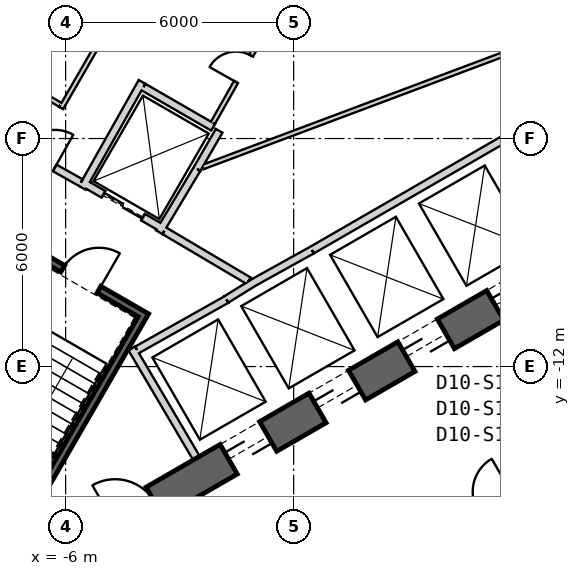
"""IFC4 building model, lengths in metres.
Left out: names, types, materials, properties, quantities, classifications, styles, units other than length and angle.
Written with IfcOpenShell. Run it as: python <this file> out.ifc"""

import sys

from ifc_helpers import new_model, si_unit, direction, frame, frame_2d, origin, place, context, subcontext, project, spatial, rectangle, extrude, element, fill, save


model = new_model("IFC4")
c1 = context("Model", 3, precision=1e-05, world=origin(), true_north=direction((0.0, 1.0)))
c2 = subcontext(c1, "Body", "Model", "MODEL_VIEW")
j1 = project(units=[si_unit("LENGTHUNIT", "METRE"), si_unit("PLANEANGLEUNIT", "RADIAN")], contexts=[c1])
p1 = place(None, origin())
s1 = spatial("IfcSite", under=j1, at=p1, CompositionType="ELEMENT")
p2 = place(p1, origin())
s2 = spatial("IfcBuilding", under=s1, at=p2, CompositionType="ELEMENT")
p3 = place(p2, frame((0.0, 0.0, 253.2)))
s3 = spatial("IfcBuildingStorey", under=s2, at=p3, CompositionType="ELEMENT", Elevation=253.2)
p4 = place(p3, frame((-7.825, -17.97, 0.0), z_axis=(0.0, 0.0, 1.0), x_axis=(0.866028369851, 0.499994862586, 0.0)))
e1 = element("IfcWall", 1, at=p4, inside=s3, PredefinedType="SHEAR", context=c2, shape_type="SweptSolid", body=[
    extrude(rectangle(XDim=31.523, YDim=0.9, at=frame_2d((15.762, 0.0))), origin(), (0.0, 0.0, 1.0), 4.0),
])
p5 = place(p4, frame((7.062, 0.0, 0.0)))
e2 = element("IfcOpeningElement", 2, at=p5, cuts=e1, PredefinedType="OPENING", context=c2, shape_type="SweptSolid", body=[
    extrude(rectangle(XDim=1.2, YDim=2.4, at=frame_2d((0.6, 1.2))), frame((0.0, 0.46, 0.0), z_axis=(0.0, -1.0, 0.0), x_axis=(1.0, 0.0, 0.0)), (0.0, 0.0, 1.0), 0.92),
])
p6 = place(p4, frame((9.762, 0.0, 0.0)))
e3 = element("IfcOpeningElement", 3, at=p6, cuts=e1, PredefinedType="OPENING", context=c2, shape_type="SweptSolid", body=[
    extrude(rectangle(XDim=1.2, YDim=2.4, at=frame_2d((0.6, 1.2))), frame((0.0, 0.46, 0.0), z_axis=(0.0, -1.0, 0.0), x_axis=(1.0, 0.0, 0.0)), (0.0, 0.0, 1.0), 0.92),
])
p7 = place(p4, frame((12.462, 0.0, 0.0)))
e4 = element("IfcOpeningElement", 4, at=p7, cuts=e1, PredefinedType="OPENING", context=c2, shape_type="SweptSolid", body=[
    extrude(rectangle(XDim=1.2, YDim=2.4, at=frame_2d((0.6, 1.2))), frame((0.0, 0.46, 0.0), z_axis=(0.0, -1.0, 0.0), x_axis=(1.0, 0.0, 0.0)), (0.0, 0.0, 1.0), 0.92),
])
p8 = place(p4, frame((15.162, 0.0, 0.0)))
e5 = element("IfcOpeningElement", 5, at=p8, cuts=e1, PredefinedType="OPENING", context=c2, shape_type="SweptSolid", body=[
    extrude(rectangle(XDim=1.2, YDim=2.4, at=frame_2d((0.6, 1.2))), frame((0.0, 0.46, 0.0), z_axis=(0.0, -1.0, 0.0), x_axis=(1.0, 0.0, 0.0)), (0.0, 0.0, 1.0), 0.92),
])
p9 = place(p4, frame((17.862, 0.0, 0.0)))
e6 = element("IfcOpeningElement", 6, at=p9, cuts=e1, PredefinedType="OPENING", context=c2, shape_type="SweptSolid", body=[
    extrude(rectangle(XDim=1.2, YDim=2.4, at=frame_2d((0.6, 1.2))), frame((0.0, 0.46, 0.0), z_axis=(0.0, -1.0, 0.0), x_axis=(1.0, 0.0, 0.0)), (0.0, 0.0, 1.0), 0.92),
])
p10 = place(p4, frame((20.562, 0.0, 0.0)))
e7 = element("IfcOpeningElement", 7, at=p10, cuts=e1, PredefinedType="OPENING", context=c2, shape_type="SweptSolid", body=[
    extrude(rectangle(XDim=1.2, YDim=2.4, at=frame_2d((0.6, 1.2))), frame((0.0, 0.46, 0.0), z_axis=(0.0, -1.0, 0.0), x_axis=(1.0, 0.0, 0.0)), (0.0, 0.0, 1.0), 0.92),
])
p11 = place(p4, frame((26.712, 0.0, 0.0)))
e8 = element("IfcOpeningElement", 8, at=p11, cuts=e1, PredefinedType="OPENING", context=c2, shape_type="SweptSolid", body=[
    extrude(rectangle(XDim=1.2, YDim=2.4, at=frame_2d((0.6, 1.2))), frame((0.0, 0.46, 0.0), z_axis=(0.0, -1.0, 0.0), x_axis=(1.0, 0.0, 0.0)), (0.0, 0.0, 1.0), 0.92),
])
p12 = place(p4, frame((3.612, 0.0, 0.0)))
e9 = element("IfcOpeningElement", 9, at=p12, cuts=e1, PredefinedType="OPENING", context=c2, shape_type="SweptSolid", body=[
    extrude(rectangle(XDim=1.2, YDim=2.4, at=frame_2d((0.6, 1.2))), frame((0.0, 0.46, 0.0), z_axis=(0.0, -1.0, 0.0), x_axis=(1.0, 0.0, 0.0)), (0.0, 0.0, 1.0), 0.92),
])
p13 = place(p3, frame((0.483, -8.936, 0.0), z_axis=(0.0, 0.0, 1.0), x_axis=(0.866030989016, 0.499990325971, 0.0)))
e10 = element("IfcWall", 10, at=p13, inside=s3, PredefinedType="PLUMBINGWALL", context=c2, shape_type="SweptSolid", body=[
    extrude(rectangle(XDim=8.1, YDim=0.2, at=frame_2d((4.05, 0.0))), origin(), (0.0, 0.0, 1.0), 3.7),
])
p14 = place(p3, frame((-2.558, -14.409, 0.0), z_axis=(0.0, 0.0, 1.0), x_axis=(-0.507997497166, 0.861358544901, 0.0)))
e11 = element("IfcWall", 11, at=p14, inside=s3, PredefinedType="PLUMBINGWALL", context=c2, shape_type="SweptSolid", body=[
    extrude(rectangle(XDim=3.35, YDim=0.2, at=frame_2d((1.675, 0.0))), origin(), (0.0, 0.0, 1.0), 3.7),
])
p15 = place(p3, frame((-1.769, -10.237, 0.0), z_axis=(0.0, 0.0, 1.0), x_axis=(-0.871534483978, -0.490334215854, 0.0)))
e12 = element("IfcWall", 12, at=p15, inside=s3, PredefinedType="PLUMBINGWALL", context=c2, shape_type="SweptSolid", body=[
    extrude(rectangle(XDim=2.7, YDim=0.2, at=frame_2d((1.35, 0.0))), origin(), (0.0, 0.0, 1.0), 3.7),
])
p16 = place(p3, frame((-1.024, -9.771, 0.0), z_axis=(0.0, 0.0, 1.0), x_axis=(-0.850348075135, -0.526220629693, 0.0)))
e13 = element("IfcWall", 13, at=p16, inside=s3, PredefinedType="PLUMBINGWALL", context=c2, shape_type="SweptSolid", body=[
    extrude(rectangle(XDim=0.878, YDim=0.2, at=frame_2d((0.439, 0.0))), origin(), (0.0, 0.0, 1.0), 3.7),
])
p17 = place(p3, frame((-1.13, -9.831, 0.0), z_axis=(0.0, 0.0, 1.0), x_axis=(0.874269620932, 0.485440655401, 0.0)))
e14 = element("IfcWall", 14, at=p17, inside=s3, PredefinedType="PLUMBINGWALL", context=c2, shape_type="SweptSolid", body=[
    extrude(rectangle(XDim=1.845, YDim=0.2, at=frame_2d((0.922, 0.0))), origin(), (0.0, 0.0, 1.0), 3.7),
])
p18 = place(p3, frame((-3.905, -10.563, -0.3), z_axis=(0.0, 0.0, 1.0), x_axis=(-0.500012932018, -0.866017937352, 0.0)))
e15 = element("IfcWall", 15, at=p18, inside=s3, PredefinedType="SHEAR", context=c2, shape_type="SweptSolid", body=[
    extrude(rectangle(XDim=8.1, YDim=0.2, at=frame_2d((4.05, 0.0))), origin(), (0.0, 0.0, 1.0), 4.0),
])
p19 = place(p3, frame((-4.041, -10.599, -0.3), z_axis=(0.0, 0.0, 1.0), x_axis=(-0.866047807691, 0.499961193289, 0.0)))
e16 = element("IfcWall", 16, at=p19, inside=s3, PredefinedType="SHEAR", context=c2, shape_type="SweptSolid", body=[
    extrude(rectangle(XDim=3.6, YDim=0.2, at=frame_2d((1.8, 0.0))), origin(), (0.0, 0.0, 1.0), 4.0),
])
p20 = place(p19, frame((1.25, 0.0, 0.3)))
e17 = element("IfcOpeningElement", 17, at=p20, cuts=e16, PredefinedType="OPENING", context=c2, shape_type="SweptSolid", body=[
    extrude(rectangle(XDim=1.1, YDim=2.1, at=frame_2d((0.55, 1.05))), frame((0.0, 0.11, 0.0), z_axis=(0.0, -1.0, 0.0), x_axis=(1.0, 0.0, 0.0)), (0.0, 0.0, 1.0), 0.22),
])
p21 = place(p3, frame((-3.446, -8.368, 0.0), z_axis=(0.0, 0.0, 1.0), x_axis=(-0.866024647952, 0.500001309137, 0.0)))
e18 = element("IfcWall", 18, at=p21, inside=s3, PredefinedType="PLUMBINGWALL", context=c2, shape_type="SweptSolid", body=[
    extrude(rectangle(XDim=2.4, YDim=0.2, at=frame_2d((1.2, 0.0))), origin(), (0.0, 0.0, 1.0), 3.7),
])
p22 = place(p21, frame((0.6, 0.0, 0.0)))
e19 = element("IfcOpeningElement", 19, at=p22, cuts=e18, PredefinedType="OPENING", context=c2, shape_type="SweptSolid", body=[
    extrude(rectangle(XDim=1.2, YDim=2.4, at=frame_2d((0.6, 1.2))), frame((0.0, 0.11, 0.0), z_axis=(0.0, -1.0, 0.0), x_axis=(1.0, 0.0, 0.0)), (0.0, 0.0, 1.0), 0.22),
])
p23 = place(p3, frame((-1.961, -5.796, 0.0), z_axis=(0.0, 0.0, 1.0), x_axis=(-0.500074377092, -0.865982457891, 0.0)))
e20 = element("IfcWall", 20, at=p23, inside=s3, PredefinedType="PLUMBINGWALL", context=c2, shape_type="SweptSolid", body=[
    extrude(rectangle(XDim=1.161, YDim=0.2, at=frame_2d((0.581, 0.0))), origin(), (0.0, 0.0, 1.0), 3.7),
])
p24 = place(p3, frame((-2.542, -6.801, 0.0), z_axis=(0.0, 0.0, 1.0), x_axis=(-0.51375503712, -0.857936921827, 0.0)))
e21 = element("IfcWall", 21, at=p24, inside=s3, PredefinedType="PLUMBINGWALL", context=c2, shape_type="SweptSolid", body=[
    extrude(rectangle(XDim=1.939, YDim=0.2, at=frame_2d((0.97, 0.0))), origin(), (0.0, 0.0, 1.0), 3.7),
])
p25 = place(p3, frame((-3.99, -4.509, 0.0), z_axis=(0.0, 0.0, 1.0), x_axis=(-0.491358283181, -0.870957540612, 0.0)))
e22 = element("IfcWall", 22, at=p25, inside=s3, PredefinedType="PLUMBINGWALL", context=c2, shape_type="SweptSolid", body=[
    extrude(rectangle(XDim=3.2, YDim=0.2, at=frame_2d((1.6, 0.0))), origin(), (0.0, 0.0, 1.0), 3.7),
])
p26 = place(p3, frame((-3.953, -4.646, 0.0), z_axis=(0.0, 0.0, 1.0), x_axis=(0.866060616833, -0.499939004251, 0.0)))
e23 = element("IfcWall", 23, at=p26, inside=s3, PredefinedType="PLUMBINGWALL", context=c2, shape_type="SweptSolid", body=[
    extrude(rectangle(XDim=2.115, YDim=0.2, at=frame_2d((1.057, 0.0))), origin(), (0.0, 0.0, 1.0), 3.7),
])
p27 = place(p3, frame((-3.401, -8.43, 0.0), z_axis=(0.0, 0.0, 1.0), x_axis=(0.860615607571, -0.509255118781, 0.0)))
e24 = element("IfcWall", 24, at=p27, inside=s3, PredefinedType="PARTITIONING", context=c2, shape_type="SweptSolid", body=[
    extrude(rectangle(XDim=2.581, YDim=0.2, at=frame_2d((1.29, 0.0))), origin(), (0.0, 0.0, 1.0), 3.7),
])
p28 = place(p3, frame((-7.849, -5.894, 0.0), z_axis=(0.0, 0.0, 1.0), x_axis=(0.871363259478, -0.490638431059, 0.0)))
e25 = element("IfcWall", 25, at=p28, inside=s3, PredefinedType="PARTITIONING", context=c2, shape_type="SweptSolid", body=[
    extrude(rectangle(XDim=2.581, YDim=0.2, at=frame_2d((1.291, 0.0))), origin(), (0.0, 0.0, 1.0), 3.7),
])
p29 = place(p28, frame((0.791, 0.0, 0.0)))
e26 = element("IfcOpeningElement", 26, at=p29, cuts=e25, PredefinedType="OPENING", context=c2, shape_type="SweptSolid", body=[
    extrude(rectangle(XDim=1.0, YDim=2.1, at=frame_2d((0.5, 1.05))), frame((0.0, 0.11, 0.0), z_axis=(0.0, -1.0, 0.0), x_axis=(1.0, 0.0, 0.0)), (0.0, 0.0, 1.0), 0.22),
])
p30 = place(p3, frame((7.5, -3.042, 0.0), z_axis=(0.0, 0.0, 1.0), x_axis=(-0.936345316301, -0.35108040196, 0.0)))
e27 = element("IfcWall", 27, at=p30, inside=s3, PredefinedType="PARTITIONING", context=c2, shape_type="SweptSolid", body=[
    extrude(rectangle(XDim=10.568, YDim=0.12, at=frame_2d((5.284, 0.0))), origin(), (0.0, 0.0, 1.0), 3.7),
])
p31 = place(p3, frame((-0.466, -2.655, 0.0), z_axis=(0.0, 0.0, 1.0), x_axis=(-0.49235580986, -0.870394023703, 0.0)))
e28 = element("IfcWall", 28, at=p31, inside=s3, PredefinedType="PARTITIONING", context=c2, shape_type="SweptSolid", body=[
    extrude(rectangle(XDim=3.368, YDim=0.12, at=frame_2d((1.684, 0.0))), origin(), (0.0, 0.0, 1.0), 3.7),
])
p32 = place(p31, frame((1.335, 0.0, 0.0)))
e29 = element("IfcOpeningElement", 29, at=p32, cuts=e28, PredefinedType="OPENING", context=c2, shape_type="SweptSolid", body=[
    extrude(rectangle(XDim=0.8, YDim=2.1, at=frame_2d((0.4, 1.05))), frame((0.0, 0.07, 0.0), z_axis=(0.0, -1.0, 0.0), x_axis=(1.0, 0.0, 0.0)), (0.0, 0.0, 1.0), 0.14),
])
p33 = place(p3, frame((-6.118, -5.197, 0.0), z_axis=(0.0, 0.0, 1.0), x_axis=(0.499990139034, 0.866031096941, 0.0)))
e30 = element("IfcWall", 30, at=p33, inside=s3, PredefinedType="PARTITIONING", context=c2, shape_type="SweptSolid", body=[
    extrude(rectangle(XDim=3.0, YDim=0.12, at=frame_2d((1.5, 0.0))), origin(), (0.0, 0.0, 1.0), 3.7),
])
p34 = place(p3, frame((-7.95, -4.041, 0.0), z_axis=(0.0, 0.0, 1.0), x_axis=(0.860112457103, -0.510104461004, 0.0)))
e31 = element("IfcWall", 31, at=p34, inside=s3, PredefinedType="PARTITIONING", context=c2, shape_type="SweptSolid", body=[
    extrude(rectangle(XDim=2.104, YDim=0.12, at=frame_2d((1.052, 0.0))), origin(), (0.0, 0.0, 1.0), 3.7),
])
p35 = place(p3, frame((4.283, -16.118, 0.0), z_axis=(0.0, 0.0, 1.0), x_axis=(0.866053019151, 0.499952165731, 0.0)))
e32 = element("IfcWall", 32, at=p35, inside=s3, PredefinedType="PARTITIONING", context=c2, shape_type="SweptSolid", body=[
    extrude(rectangle(XDim=2.3, YDim=0.12, at=frame_2d((1.15, 0.0))), origin(), (0.0, 0.0, 1.0), 3.7),
])
p36 = place(p35, frame((0.65, 0.0, 0.0)))
e33 = element("IfcOpeningElement", 33, at=p36, cuts=e32, PredefinedType="OPENING", context=c2, shape_type="SweptSolid", body=[
    extrude(rectangle(XDim=1.0, YDim=2.1, at=frame_2d((0.5, 1.05))), frame((0.0, 0.07, 0.0), z_axis=(0.0, -1.0, 0.0), x_axis=(1.0, 0.0, 0.0)), (0.0, 0.0, 1.0), 0.14),
])
p37 = place(p20, origin())
e34 = element("IfcDoor", 34, at=p37, inside=s3, OperationType="SINGLE_SWING_RIGHT", PredefinedType="USERDEFINED", context=c2, shape_type="SweptSolid", body=[
    extrude(rectangle(XDim=1.1, YDim=2.1, at=frame_2d((0.55, 1.05))), frame((0.0, 0.025, 0.0), z_axis=(0.0, -1.0, 0.0), x_axis=(1.0, 0.0, 0.0)), (0.0, 0.0, 1.0), 0.05),
])
fill(e17, e34)
p38 = place(p29, origin())
e35 = element("IfcDoor", 35, at=p38, inside=s3, OperationType="SINGLE_SWING_RIGHT", PredefinedType="USERDEFINED", context=c2, shape_type="SweptSolid", body=[
    extrude(rectangle(XDim=1.0, YDim=2.1, at=frame_2d((0.5, 1.05))), frame((0.0, 0.025, 0.0), z_axis=(0.0, -1.0, 0.0), x_axis=(1.0, 0.0, 0.0)), (0.0, 0.0, 1.0), 0.05),
])
fill(e26, e35)
p39 = place(p22, origin())
e36 = element("IfcDoor", 36, at=p39, inside=s3, OperationType="SLIDING_TO_LEFT", PredefinedType="USERDEFINED", context=c2, shape_type="SweptSolid", body=[
    extrude(rectangle(XDim=1.2, YDim=2.4, at=frame_2d((0.6, 1.2))), frame((0.0, 0.025, 0.0), z_axis=(0.0, -1.0, 0.0), x_axis=(1.0, 0.0, 0.0)), (0.0, 0.0, 1.0), 0.05),
])
fill(e19, e36)
p40 = place(p32, origin())
e37 = element("IfcDoor", 37, at=p40, inside=s3, OperationType="SINGLE_SWING_RIGHT", PredefinedType="USERDEFINED", context=c2, shape_type="SweptSolid", body=[
    extrude(rectangle(XDim=0.8, YDim=2.1, at=frame_2d((0.4, 1.05))), frame((0.0, 0.025, 0.0), z_axis=(0.0, -1.0, 0.0), x_axis=(1.0, 0.0, 0.0)), (0.0, 0.0, 1.0), 0.05),
])
fill(e29, e37)
p41 = place(p36, origin())
e38 = element("IfcDoor", 38, at=p41, inside=s3, OperationType="SINGLE_SWING_LEFT", PredefinedType="NOTDEFINED", context=c2, shape_type="SweptSolid", body=[
    extrude(rectangle(XDim=1.0, YDim=2.1, at=frame_2d((0.5, 1.05))), frame((0.0, 0.025, 0.0), z_axis=(0.0, -1.0, 0.0), x_axis=(1.0, 0.0, 0.0)), (0.0, 0.0, 1.0), 0.05),
])
fill(e33, e38)
p42 = place(p5, origin())
e39 = element("IfcDoor", 39, at=p42, inside=s3, OperationType="SLIDING_TO_LEFT", PredefinedType="USERDEFINED", context=c2, shape_type="SweptSolid", body=[
    extrude(rectangle(XDim=1.2, YDim=2.4, at=frame_2d((0.6, 1.2))), frame((0.0, 0.025, 0.0), z_axis=(0.0, -1.0, 0.0), x_axis=(1.0, 0.0, 0.0)), (0.0, 0.0, 1.0), 0.05),
])
fill(e2, e39)
p43 = place(p6, origin())
e40 = element("IfcDoor", 40, at=p43, inside=s3, OperationType="SLIDING_TO_LEFT", PredefinedType="USERDEFINED", context=c2, shape_type="SweptSolid", body=[
    extrude(rectangle(XDim=1.2, YDim=2.4, at=frame_2d((0.6, 1.2))), frame((0.0, 0.025, 0.0), z_axis=(0.0, -1.0, 0.0), x_axis=(1.0, 0.0, 0.0)), (0.0, 0.0, 1.0), 0.05),
])
fill(e3, e40)
p44 = place(p7, origin())
e41 = element("IfcDoor", 41, at=p44, inside=s3, OperationType="SLIDING_TO_LEFT", PredefinedType="USERDEFINED", context=c2, shape_type="SweptSolid", body=[
    extrude(rectangle(XDim=1.2, YDim=2.4, at=frame_2d((0.6, 1.2))), frame((0.0, 0.025, 0.0), z_axis=(0.0, -1.0, 0.0), x_axis=(1.0, 0.0, 0.0)), (0.0, 0.0, 1.0), 0.05),
])
fill(e4, e41)
p45 = place(p8, origin())
e42 = element("IfcDoor", 42, at=p45, inside=s3, OperationType="SLIDING_TO_LEFT", PredefinedType="USERDEFINED", context=c2, shape_type="SweptSolid", body=[
    extrude(rectangle(XDim=1.2, YDim=2.4, at=frame_2d((0.6, 1.2))), frame((0.0, 0.025, 0.0), z_axis=(0.0, -1.0, 0.0), x_axis=(1.0, 0.0, 0.0)), (0.0, 0.0, 1.0), 0.05),
])
fill(e5, e42)
save(model, sys.argv[1])
